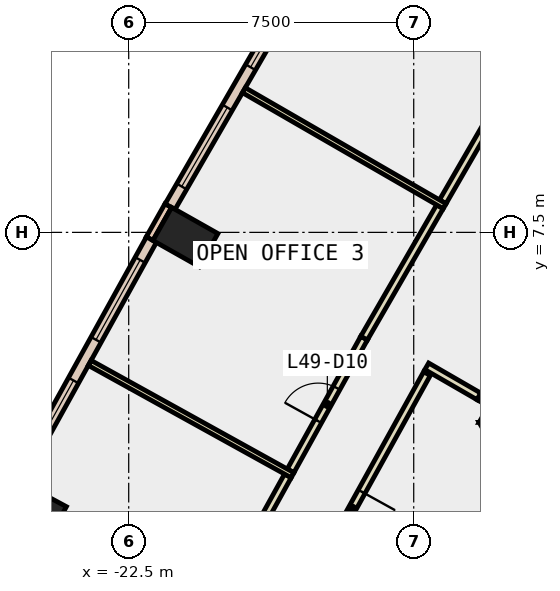
"""IFC4 building model, lengths in metres.
Left out: names, types, materials, properties, quantities, classifications, styles, units other than length and angle.
Written with IfcOpenShell. Run it as: python <this file> out.ifc"""

import sys

from ifc_helpers import new_model, si_unit, direction, frame, frame_2d, origin, origin_2d, place, context, subcontext, project, spatial, polyline, rectangle, outline, extrude, element, fill, save


model = new_model("IFC4")
c1 = context("Model", 3, precision=1e-05, world=origin(), true_north=direction((0.0, 1.0)))
c2 = subcontext(c1, "Body", "Model", "MODEL_VIEW")
j1 = project(units=[si_unit("LENGTHUNIT", "METRE"), si_unit("PLANEANGLEUNIT", "RADIAN")], contexts=[c1])
p1 = place(None, origin())
s1 = spatial("IfcSite", under=j1, at=p1, CompositionType="ELEMENT")
p2 = place(p1, origin())
s2 = spatial("IfcBuilding", under=s1, at=p2, CompositionType="ELEMENT")
p3 = place(p2, frame((0.0, 0.0, 219.2)))
s3 = spatial("IfcBuildingStorey", under=s2, at=p3, CompositionType="ELEMENT", Elevation=219.2)
for number, where, z_axis, x_axis in (
    (1, (-21.007, 7.377, -0.4), (0.0, 0.0, 1.0), (0.491, 0.871, 0.0)),
    (2, (-24.993, 0.175, -0.4), (0.0, 0.0, 1.0), (0.474, 0.88, 0.0)),
):
    element("IfcColumn", number, at=place(p3, frame(where, z_axis=z_axis, x_axis=x_axis)), inside=s3, PredefinedType="COLUMN", context=c2, shape_type="SweptSolid", body=[
        extrude(rectangle(XDim=1.0, YDim=1.4, at=origin_2d()), origin(), (0.0, 0.0, 1.0), 4.2),
    ])
p4 = place(p3, frame((0.0, 0.0, -0.4)))
e3 = element("IfcWall", 3, at=p4, inside=s3, PredefinedType="SHEAR", context=c2, shape_type="SweptSolid", body=[
    extrude(outline(polyline([(-12.228, 2.92), (-12.834, 3.27), (-13.279, 2.5), (-12.471, 2.5), (-12.228, 2.92)])), origin(), (0.0, 0.0, 1.0), 4.2),
])
p5 = place(p3, frame((0.0, 0.0, -0.4)))
e4 = element("IfcWall", 4, at=p5, inside=s3, PredefinedType="SHEAR", context=c2, shape_type="SweptSolid", body=[
    extrude(outline(polyline([(-13.279, 2.5), (-6.64, -9.0), (-6.235, -8.3), (-12.471, 2.5), (-13.279, 2.5)])), origin(), (0.0, 0.0, 1.0), 4.2),
])
p6 = place(p3, frame((-21.458, 8.205, 0.0), z_axis=(0.0, 0.0, 1.0), x_axis=(-0.491743606947, -0.87074004446, 0.0)))
e5 = element("IfcWall", 5, at=p6, inside=s3, PredefinedType="STANDARD", context=c2, shape_type="SweptSolid", body=[
    extrude(rectangle(XDim=1.0, YDim=0.2, at=frame_2d((0.5, 0.0))), origin(), (0.0, 0.0, 1.0), 3.8),
])
p7 = place(p3, frame((-17.787, 14.454, 0.0), z_axis=(0.0, 0.0, 1.0), x_axis=(-0.499968351115, -0.866043675505, 0.0)))
e6 = element("IfcWall", 6, at=p7, inside=s3, PredefinedType="STANDARD", context=c2, shape_type="SweptSolid", body=[
    extrude(rectangle(XDim=7.248, YDim=0.3, at=frame_2d((3.624, 0.0))), origin(), (0.0, 0.0, 1.0), 3.8),
])
p8 = place(p7, frame((0.612, 0.0, 0.9)))
e7 = element("IfcOpeningElement", 7, at=p8, cuts=e6, PredefinedType="OPENING", context=c2, shape_type="SweptSolid", body=[
    extrude(rectangle(XDim=2.4, YDim=2.6, at=frame_2d((1.2, 1.3))), frame((0.0, 0.16, 0.0), z_axis=(0.0, -1.0, 0.0), x_axis=(1.0, 0.0, 0.0)), (0.0, 0.0, 1.0), 0.32),
])
p9 = place(p7, frame((4.236, 0.0, 0.9)))
e8 = element("IfcOpeningElement", 8, at=p9, cuts=e6, PredefinedType="OPENING", context=c2, shape_type="SweptSolid", body=[
    extrude(rectangle(XDim=2.4, YDim=2.6, at=frame_2d((1.2, 1.3))), frame((0.0, 0.16, 0.0), z_axis=(0.0, -1.0, 0.0), x_axis=(1.0, 0.0, 0.0)), (0.0, 0.0, 1.0), 0.32),
])
p10 = place(p3, frame((-21.902, 7.309, 0.0), z_axis=(0.0, 0.0, 1.0), x_axis=(-0.484163461668, -0.87497756679, 0.0)))
e9 = element("IfcWall", 9, at=p10, inside=s3, PredefinedType="STANDARD", context=c2, shape_type="SweptSolid", body=[
    extrude(rectangle(XDim=7.247, YDim=0.3, at=frame_2d((3.624, 0.0))), origin(), (0.0, 0.0, 1.0), 3.8),
])
p11 = place(p10, frame((0.612, 0.0, 0.9)))
e10 = element("IfcOpeningElement", 10, at=p11, cuts=e9, PredefinedType="OPENING", context=c2, shape_type="SweptSolid", body=[
    extrude(rectangle(XDim=2.4, YDim=2.6, at=frame_2d((1.2, 1.3))), frame((0.0, 0.16, 0.0), z_axis=(0.0, -1.0, 0.0), x_axis=(1.0, 0.0, 0.0)), (0.0, 0.0, 1.0), 0.32),
])
p12 = place(p10, frame((4.235, 0.0, 0.9)))
e11 = element("IfcOpeningElement", 11, at=p12, cuts=e9, PredefinedType="OPENING", context=c2, shape_type="SweptSolid", body=[
    extrude(rectangle(XDim=2.4, YDim=2.6, at=frame_2d((1.2, 1.3))), frame((0.0, 0.16, 0.0), z_axis=(0.0, -1.0, 0.0), x_axis=(1.0, 0.0, 0.0)), (0.0, 0.0, 1.0), 0.32),
])
p13 = place(p3, frame((-12.984, 3.01, 0.0), z_axis=(0.0, 0.0, 1.0), x_axis=(-0.866046247233, 0.49996389635, 0.0)))
e12 = element("IfcWall", 12, at=p13, inside=s3, PredefinedType="PARTITIONING", context=c2, shape_type="SweptSolid", body=[
    extrude(rectangle(XDim=0.35, YDim=0.2, at=frame_2d((0.175, 0.0))), origin(), (0.0, 0.0, 1.0), 2.4),
])
p14 = place(p3, frame((-14.652, 3.783, 0.0), z_axis=(0.0, 0.0, 1.0), x_axis=(-0.484249955458, -0.874929700398, 0.0)))
e13 = element("IfcWall", 13, at=p14, inside=s3, PredefinedType="PARTITIONING", context=c2, shape_type="SweptSolid", body=[
    extrude(rectangle(XDim=8.099, YDim=0.2, at=frame_2d((4.049, 0.0))), origin(), (0.0, 0.0, 1.0), 3.8),
])
p15 = place(p14, frame((3.55, 0.0, 0.0)))
e14 = element("IfcOpeningElement", 14, at=p15, cuts=e13, PredefinedType="OPENING", context=c2, shape_type="SweptSolid", body=[
    extrude(rectangle(XDim=1.0, YDim=2.1, at=frame_2d((0.5, 1.05))), frame((0.0, 0.11, 0.0), z_axis=(0.0, -1.0, 0.0), x_axis=(1.0, 0.0, 0.0)), (0.0, 0.0, 1.0), 0.22),
])
p16 = place(p3, frame((-14.236, 8.305, 0.0), z_axis=(0.0, 0.0, 1.0), x_axis=(0.500110539333, 0.865961574464, 0.0)))
e15 = element("IfcWall", 15, at=p16, inside=s3, PredefinedType="PARTITIONING", context=c2, shape_type="SweptSolid", body=[
    extrude(rectangle(XDim=3.993, YDim=0.2, at=frame_2d((1.997, 0.0))), origin(), (0.0, 0.0, 1.0), 3.8),
])
p17 = place(p3, frame((-18.24, 1.225, 0.0), z_axis=(0.0, 0.0, 1.0), x_axis=(0.484411997038, 0.874839995156, 0.0)))
e16 = element("IfcWall", 16, at=p17, inside=s3, PredefinedType="PARTITIONING", context=c2, shape_type="SweptSolid", body=[
    extrude(rectangle(XDim=3.993, YDim=0.2, at=frame_2d((1.996, 0.0))), origin(), (0.0, 0.0, 1.0), 3.8),
])
p18 = place(p17, frame((1.496, 0.0, 0.0)))
e17 = element("IfcOpeningElement", 17, at=p18, cuts=e16, PredefinedType="OPENING", context=c2, shape_type="SweptSolid", body=[
    extrude(rectangle(XDim=1.0, YDim=2.1, at=frame_2d((0.5, 1.05))), frame((0.0, 0.11, 0.0), z_axis=(0.0, -1.0, 0.0), x_axis=(1.0, 0.0, 0.0)), (0.0, 0.0, 1.0), 0.22),
])
for number, where, z_axis, x_axis in (
    (18, (-16.306, 4.718, 0.0), (0.0, 0.0, 1.0), (0.5, 0.866, 0.0)),
    (19, (-20.245, -2.398, 0.0), (0.0, 0.0, 1.0), (0.484, 0.875, 0.0)),
):
    element("IfcWall", number, at=place(p3, frame(where, z_axis=z_axis, x_axis=x_axis)), inside=s3, PredefinedType="PARTITIONING", context=c2, shape_type="SweptSolid", body=[
        extrude(rectangle(XDim=3.991, YDim=0.2, at=frame_2d((1.996, 0.0))), origin(), (0.0, 0.0, 1.0), 3.8),
    ])
p19 = place(p3, frame((-14.187, 8.19, 0.0), z_axis=(0.0, 0.0, 1.0), x_axis=(-0.865990270311, 0.500060848024, 0.0)))
e20 = element("IfcWall", 20, at=p19, inside=s3, PredefinedType="PARTITIONING", context=c2, shape_type="SweptSolid", body=[
    extrude(rectangle(XDim=6.099, YDim=0.15, at=frame_2d((3.05, 0.0))), origin(), (0.0, 0.0, 1.0), 3.8),
])
p20 = place(p3, frame((-18.189, 1.111, 0.0), z_axis=(0.0, 0.0, 1.0), x_axis=(-0.874928335558, 0.484252421405, 0.0)))
e21 = element("IfcWall", 21, at=p20, inside=s3, PredefinedType="PARTITIONING", context=c2, shape_type="SweptSolid", body=[
    extrude(rectangle(XDim=6.1, YDim=0.15, at=frame_2d((3.05, 0.0))), origin(), (0.0, 0.0, 1.0), 3.8),
])
p21 = place(p3, frame((-13.287, 3.185, 0.0), z_axis=(0.0, 0.0, 1.0), x_axis=(-0.865992812752, 0.500056445075, 0.0)))
e22 = element("IfcWall", 22, at=p21, inside=s3, PredefinedType="PARTITIONING", context=c2, shape_type="SweptSolid", body=[
    extrude(rectangle(XDim=1.582, YDim=0.2, at=frame_2d((0.791, 0.0))), origin(), (0.0, 0.0, 1.0), 3.8),
])
p22 = place(p8, origin())
e23 = element("IfcWindow", 23, at=p22, inside=s3, PartitioningType="SINGLE_PANEL", PredefinedType="WINDOW", context=c2, shape_type="SweptSolid", body=[
    extrude(rectangle(XDim=2.4, YDim=2.6, at=frame_2d((1.2, 1.3))), frame((0.0, 0.03, 0.0), z_axis=(0.0, -1.0, 0.0), x_axis=(1.0, 0.0, 0.0)), (0.0, 0.0, 1.0), 0.06),
])
fill(e7, e23)
p23 = place(p9, origin())
e24 = element("IfcWindow", 24, at=p23, inside=s3, PartitioningType="SINGLE_PANEL", PredefinedType="WINDOW", context=c2, shape_type="SweptSolid", body=[
    extrude(rectangle(XDim=2.4, YDim=2.6, at=frame_2d((1.2, 1.3))), frame((0.0, 0.03, 0.0), z_axis=(0.0, -1.0, 0.0), x_axis=(1.0, 0.0, 0.0)), (0.0, 0.0, 1.0), 0.06),
])
fill(e8, e24)
p24 = place(p11, origin())
e25 = element("IfcWindow", 25, at=p24, inside=s3, PartitioningType="SINGLE_PANEL", PredefinedType="WINDOW", context=c2, shape_type="SweptSolid", body=[
    extrude(rectangle(XDim=2.4, YDim=2.6, at=frame_2d((1.2, 1.3))), frame((0.0, 0.03, 0.0), z_axis=(0.0, -1.0, 0.0), x_axis=(1.0, 0.0, 0.0)), (0.0, 0.0, 1.0), 0.06),
])
fill(e10, e25)
p25 = place(p12, origin())
e26 = element("IfcWindow", 26, at=p25, inside=s3, PartitioningType="SINGLE_PANEL", PredefinedType="WINDOW", context=c2, shape_type="SweptSolid", body=[
    extrude(rectangle(XDim=2.4, YDim=2.6, at=frame_2d((1.2, 1.3))), frame((0.0, 0.03, 0.0), z_axis=(0.0, -1.0, 0.0), x_axis=(1.0, 0.0, 0.0)), (0.0, 0.0, 1.0), 0.06),
])
fill(e11, e26)
p26 = place(p18, origin())
e27 = element("IfcDoor", 27, at=p26, inside=s3, OperationType="SINGLE_SWING_LEFT", PredefinedType="DOOR", context=c2, shape_type="SweptSolid", body=[
    extrude(rectangle(XDim=1.0, YDim=2.1, at=frame_2d((0.5, 1.05))), frame((0.0, 0.025, 0.0), z_axis=(0.0, -1.0, 0.0), x_axis=(1.0, 0.0, 0.0)), (0.0, 0.0, 1.0), 0.05),
])
fill(e17, e27)
p27 = place(p15, origin())
e28 = element("IfcDoor", 28, at=p27, inside=s3, OperationType="SINGLE_SWING_LEFT", PredefinedType="DOOR", context=c2, shape_type="SweptSolid", body=[
    extrude(rectangle(XDim=1.0, YDim=2.1, at=frame_2d((0.5, 1.05))), frame((0.0, 0.025, 0.0), z_axis=(0.0, -1.0, 0.0), x_axis=(1.0, 0.0, 0.0)), (0.0, 0.0, 1.0), 0.05),
])
fill(e14, e28)
save(model, sys.argv[1])
